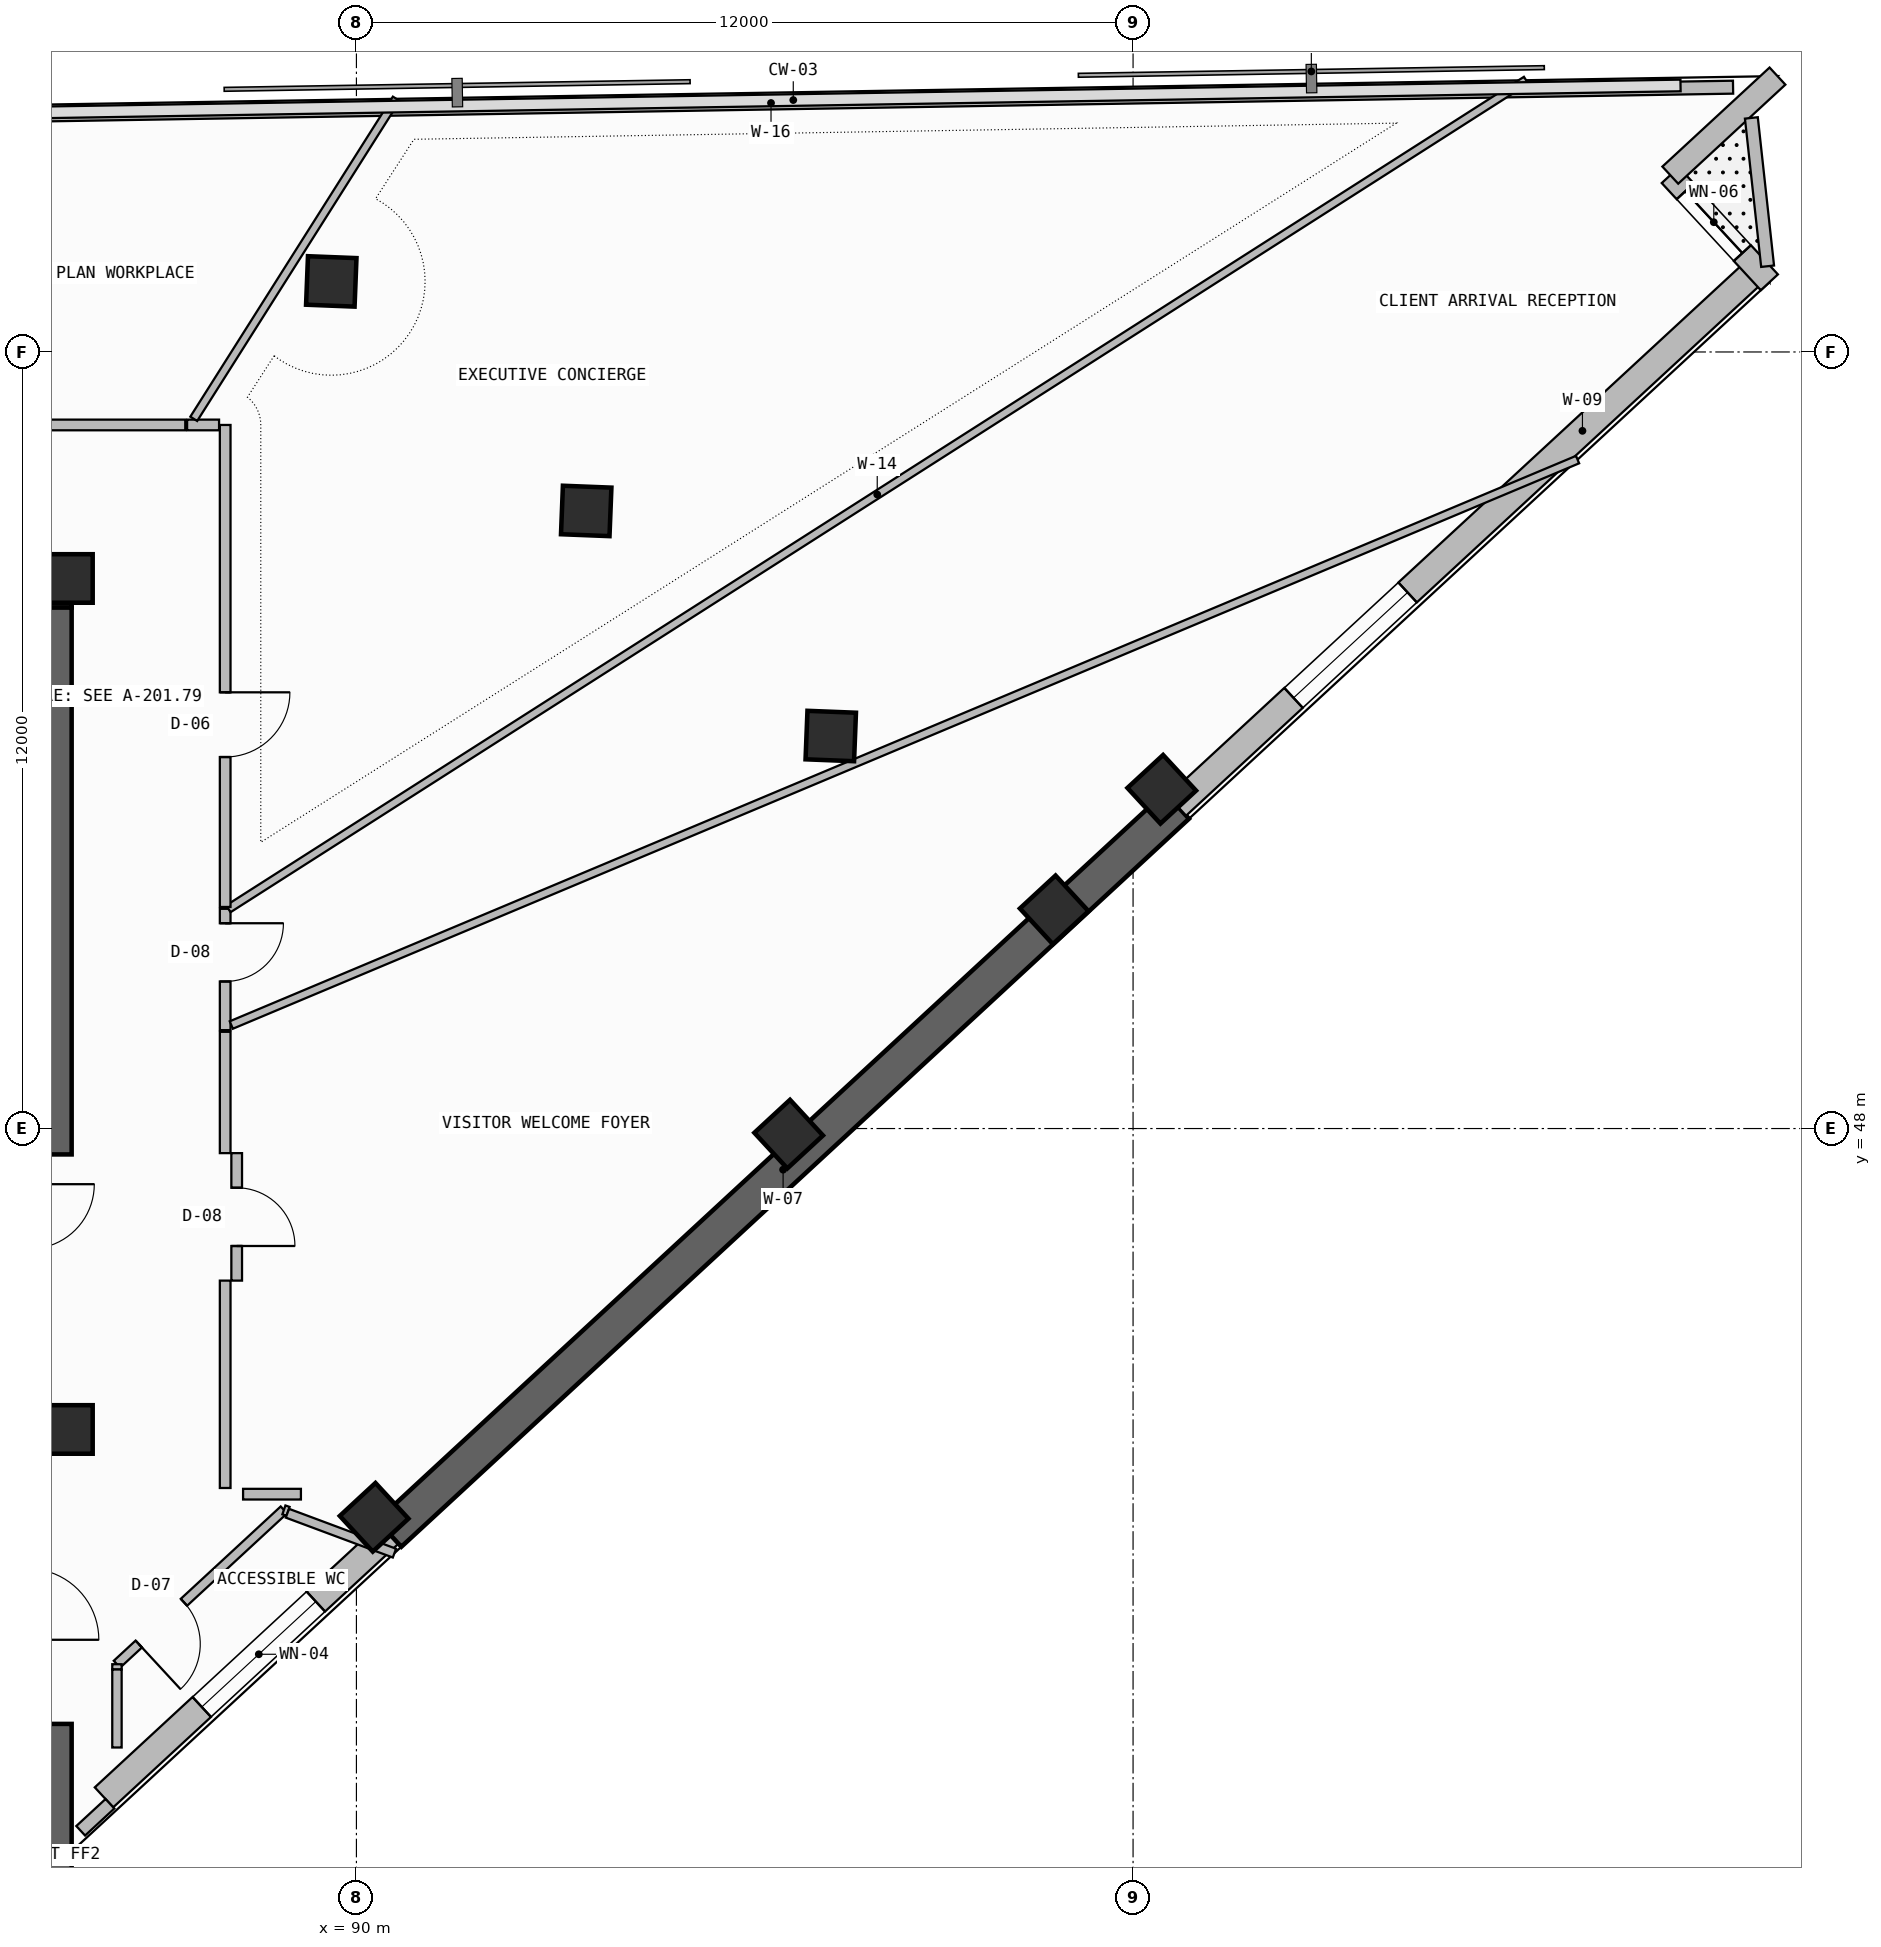
"""IFC4 building model, lengths in metres.
Left out: names, types, materials, properties, quantities, classifications, styles, units other than length and angle.
Written with IfcOpenShell. Run it as: python <this file> out.ifc"""

import sys

from ifc_helpers import new_model, si_unit, direction, frame, frame_2d, origin, origin_2d, place, context, subcontext, project, spatial, rectangle, extrude, element, fill, save


model = new_model("IFC4")
c1 = context("Model", 3, precision=1e-05, world=origin(), true_north=direction((0.0, 1.0)))
c2 = subcontext(c1, "Body", "Model", "MODEL_VIEW")
j1 = project(units=[si_unit("LENGTHUNIT", "METRE"), si_unit("PLANEANGLEUNIT", "RADIAN")], contexts=[c1])
p1 = place(None, origin())
s1 = spatial("IfcSite", under=j1, at=p1, CompositionType="ELEMENT")
p2 = place(p1, origin())
s2 = spatial("IfcBuilding", under=s1, at=p2, CompositionType="ELEMENT")
p3 = place(p2, frame((0.0, 0.0, 281.86)))
s3 = spatial("IfcBuildingStorey", under=s2, at=p3, CompositionType="ELEMENT", Elevation=281.86)
p4 = place(p3, frame((85.3, 35.5, -0.26), z_axis=(0.0, 0.0, 1.0), x_axis=(0.0, 1.0, 0.0)))
e1 = element("IfcWall", 1, at=p4, inside=s3, PredefinedType="SHEAR", context=c2, shape_type="SweptSolid", body=[
    extrude(rectangle(XDim=3.3, YDim=0.6, at=frame_2d((1.65, 0.0))), origin(), (0.0, 0.0, 1.0), 3.52),
])
p5 = place(p3, frame((72.0, 56.35, -0.26), z_axis=(0.0, 0.0, 1.0), x_axis=(1.0, 0.0, 0.0)))
e2 = element("IfcWall", 2, at=p5, inside=s3, PredefinedType="SHEAR", context=c2, shape_type="SweptSolid", body=[
    extrude(rectangle(XDim=13.6, YDim=0.6, at=frame_2d((6.8, 0.0))), origin(), (0.0, 0.0, 1.0), 3.52),
])
p6 = place(p3, frame((85.3, 47.6, -0.26), z_axis=(0.0, 0.0, 1.0), x_axis=(0.0, 1.0, 0.0)))
e3 = element("IfcWall", 3, at=p6, inside=s3, PredefinedType="SHEAR", context=c2, shape_type="SweptSolid", body=[
    extrude(rectangle(XDim=8.45, YDim=0.6, at=frame_2d((4.225, 0.0))), origin(), (0.0, 0.0, 1.0), 3.52),
])
for number, where, z_axis, x_axis in (
    (4, (85.55, 43.35, 0.0), (0.0, 0.0, 1.0), (1.0, 0.0, 0.0)),
    (5, (85.55, 56.5, 0.0), (0.0, 0.0, 1.0), (1.0, 0.0, 0.0)),
    (6, (90.273, 41.993, 0.0), (0.0, 0.0, 1.0), (0.734, 0.679, 0.0)),
    (7, (96.679, 47.914, 0.0), (0.0, 0.0, 1.0), (0.734, 0.679, 0.0)),
    (8, (102.443, 53.242, 0.0), (0.0, 0.0, 1.0), (0.734, 0.679, 0.0)),
    (9, (100.782, 51.38, 0.0), (0.0, 0.0, 1.0), (0.734, 0.679, 0.0)),
    (10, (97.329, 54.065, 0.0), (0.0, 0.0, 1.0), (0.039, 0.999, 0.0)),
    (11, (93.55, 57.544, 0.0), (0.0, 0.0, 1.0), (0.039, 0.999, 0.0)),
    (12, (89.611, 61.09, 0.0), (0.0, 0.0, 1.0), (0.039, 0.999, 0.0)),
):
    element("IfcColumn", number, at=place(p3, frame(where, z_axis=z_axis, x_axis=x_axis)), inside=s3, PredefinedType="COLUMN", context=c2, shape_type="SweptSolid", body=[
        extrude(rectangle(XDim=0.75, YDim=0.75, at=origin_2d()), origin(), (0.0, 0.0, 1.0), 3.52),
    ])
p7 = place(p3, frame((86.1, 37.665, 0.0), z_axis=(0.0, 0.0, 1.0), x_axis=(0.734321413343, 0.678801931277, 0.0)))
e13 = element("IfcWall", 13, at=p7, inside=s3, PredefinedType="SOLIDWALL", context=c2, shape_type="SweptSolid", body=[
    extrude(rectangle(XDim=6.002, YDim=0.42, at=frame_2d((3.001, 0.0))), origin(), (0.0, 0.0, 1.0), 2.245),
])
p8 = place(p7, frame((2.057, 0.0, 0.965)))
e14 = element("IfcOpeningElement", 14, at=p8, cuts=e13, PredefinedType="OPENING", context=c2, shape_type="SweptSolid", body=[
    extrude(rectangle(XDim=2.4, YDim=1.2, at=frame_2d((1.2, 0.6))), frame((0.0, 0.22, 0.0), z_axis=(0.0, -1.0, 0.0), x_axis=(1.0, 0.0, 0.0)), (0.0, 0.0, 1.0), 0.44),
])
p9 = place(p3, frame((90.508, 41.74, -0.26), z_axis=(0.0, 0.0, 1.0), x_axis=(0.734315848115, 0.678807951638, 0.0)))
e15 = element("IfcWall", 15, at=p9, inside=s3, PredefinedType="SHEAR", context=c2, shape_type="SweptSolid", body=[
    extrude(rectangle(XDim=16.573, YDim=0.55, at=frame_2d((8.286, 0.0))), origin(), (0.0, 0.0, 1.0), 3.52),
])
p10 = place(p3, frame((102.677, 52.989, 0.0), z_axis=(0.0, 0.0, 1.0), x_axis=(0.734331107219, 0.678791444386, 0.0)))
e16 = element("IfcWall", 16, at=p10, inside=s3, PredefinedType="SOLIDWALL", context=c2, shape_type="SweptSolid", body=[
    extrude(rectangle(XDim=12.211, YDim=0.42, at=frame_2d((6.106, 0.0))), origin(), (0.0, 0.0, 1.0), 2.245),
])
p11 = place(p10, frame((2.454, 0.0, 0.965)))
e17 = element("IfcOpeningElement", 17, at=p11, cuts=e16, PredefinedType="OPENING", context=c2, shape_type="SweptSolid", body=[
    extrude(rectangle(XDim=2.4, YDim=1.2, at=frame_2d((1.2, 0.6))), frame((0.0, 0.22, 0.0), z_axis=(0.0, -1.0, 0.0), x_axis=(1.0, 0.0, 0.0)), (0.0, 0.0, 1.0), 0.44),
])
p12 = place(p3, frame((111.832, 61.076, 0.0), z_axis=(0.0, 0.0, 1.0), x_axis=(-0.678792531533, 0.734330102294, 0.0)))
e18 = element("IfcWall", 18, at=p12, inside=s3, PredefinedType="SOLIDWALL", context=c2, shape_type="SweptSolid", body=[
    extrude(rectangle(XDim=2.255, YDim=0.36, at=frame_2d((1.127, 0.0))), origin(), (0.0, 0.0, 1.0), 3.26),
])
p13 = place(p12, frame((0.615, 0.0, 0.45)))
e19 = element("IfcOpeningElement", 19, at=p13, cuts=e18, PredefinedType="OPENING", context=c2, shape_type="SweptSolid", body=[
    extrude(rectangle(XDim=1.3, YDim=2.4, at=frame_2d((0.65, 1.2))), frame((0.0, 0.19, 0.0), z_axis=(0.0, -1.0, 0.0), x_axis=(1.0, 0.0, 0.0)), (0.0, 0.0, 1.0), 0.38),
])
p14 = place(p3, frame((110.301, 62.732, 0.0), z_axis=(0.0, 0.0, 1.0), x_axis=(0.734330102294, 0.678792531533, 0.0)))
e20 = element("IfcWall", 20, at=p14, inside=s3, PredefinedType="SOLIDWALL", context=c2, shape_type="SweptSolid", body=[
    extrude(rectangle(XDim=2.255, YDim=0.36, at=frame_2d((1.127, 0.0))), origin(), (0.0, 0.0, 1.0), 3.26),
])
p15 = place(p3, frame((111.804, 61.325, 0.0), z_axis=(0.0, 0.0, 1.0), x_axis=(-0.10875765817, 0.994068293323, 0.0)))
e21 = element("IfcWall", 21, at=p15, inside=s3, PredefinedType="PARAPET", context=c2, shape_type="SweptSolid", body=[
    extrude(rectangle(XDim=2.305, YDim=0.2, at=frame_2d((1.153, 0.0))), origin(), (0.0, 0.0, 1.0), 1.15),
])
p16 = place(p3, frame((111.271, 64.092, 0.0), z_axis=(0.0, 0.0, 1.0), x_axis=(-0.999864741935, -0.016446818413, 0.0)))
e22 = element("IfcWall", 22, at=p16, inside=s3, PredefinedType="PARAPET", context=c2, shape_type="SweptSolid", body=[
    extrude(rectangle(XDim=29.733, YDim=0.2, at=frame_2d((14.866, 0.0))), origin(), (0.0, 0.0, 1.0), 1.15),
])
p17 = place(p3, frame((86.192, 37.566, 0.0), z_axis=(0.0, 0.0, 1.0), x_axis=(-0.734346728958, -0.678774544064, 0.0)))
e23 = element("IfcWall", 23, at=p17, inside=s3, PredefinedType="PARAPET", context=c2, shape_type="SweptSolid", body=[
    extrude(rectangle(XDim=0.615, YDim=0.2, at=frame_2d((0.308, 0.0))), origin(), (0.0, 0.0, 1.0), 1.15),
])
p18 = place(p3, frame((86.3, 39.722, 0.0), z_axis=(0.0, 0.0, 1.0), x_axis=(0.734328937731, 0.678793791376, 0.0)))
e24 = element("IfcWall", 24, at=p18, inside=s3, PredefinedType="PARTITIONING", context=c2, shape_type="SweptSolid", body=[
    extrude(rectangle(XDim=3.512, YDim=0.145, at=frame_2d((1.756, 0.0))), origin(), (0.0, 0.0, 1.0), 3.26),
])
p19 = place(p18, frame((0.459, 0.0, 0.0)))
e25 = element("IfcOpeningElement", 25, at=p19, cuts=e24, PredefinedType="OPENING", context=c2, shape_type="SweptSolid", body=[
    extrude(rectangle(XDim=0.95, YDim=2.15, at=frame_2d((0.475, 1.075))), frame((0.0, 0.083, 0.0), z_axis=(0.0, -1.0, 0.0), x_axis=(1.0, 0.0, 0.0)), (0.0, 0.0, 1.0), 0.165),
])
p20 = place(p3, frame((86.3, 39.641, 0.0), z_axis=(0.0, 0.0, 1.0), x_axis=(0.0, 1.0, 0.0)))
e26 = element("IfcWall", 26, at=p20, inside=s3, PredefinedType="PARTITIONING", context=c2, shape_type="SweptSolid", body=[
    extrude(rectangle(XDim=0.082, YDim=0.145, at=frame_2d((0.041, 0.0))), origin(), (0.0, 0.0, 1.0), 3.26),
])
p21 = place(p3, frame((88.879, 42.107, 0.0), z_axis=(0.0, 0.0, 1.0), x_axis=(0.946510188179, -0.322673927788, 0.0)))
e27 = element("IfcWall", 27, at=p21, inside=s3, PredefinedType="PARTITIONING", context=c2, shape_type="SweptSolid", body=[
    extrude(rectangle(XDim=0.068, YDim=0.145, at=frame_2d((0.034, 0.0))), origin(), (0.0, 0.0, 1.0), 3.26),
])
p22 = place(p3, frame((88.934, 42.055, 0.0), z_axis=(0.0, 0.0, 1.0), x_axis=(0.937037747799, -0.349228090508, 0.0)))
e28 = element("IfcWall", 28, at=p22, inside=s3, PredefinedType="PARTITIONING", context=c2, shape_type="SweptSolid", body=[
    extrude(rectangle(XDim=1.765, YDim=0.145, at=frame_2d((0.883, 0.0))), origin(), (0.0, 0.0, 1.0), 2.245),
])
p23 = place(p3, frame((87.972, 49.521, 0.0), z_axis=(0.0, 0.0, 1.0), x_axis=(0.0, 1.0, 0.0)))
e29 = element("IfcWall", 29, at=p23, inside=s3, PredefinedType="PARTITIONING", context=c2, shape_type="SweptSolid", body=[
    extrude(rectangle(XDim=1.875, YDim=0.165, at=frame_2d((0.938, 0.0))), origin(), (0.0, 0.0, 1.0), 3.26),
])
p24 = place(p23, frame((0.752, 0.0, 0.0)))
e30 = element("IfcOpeningElement", 30, at=p24, cuts=e29, PredefinedType="OPENING", context=c2, shape_type="SweptSolid", body=[
    extrude(rectangle(XDim=0.9, YDim=2.1, at=frame_2d((0.45, 1.05))), frame((0.0, 0.093, 0.0), z_axis=(0.0, -1.0, 0.0), x_axis=(1.0, 0.0, 0.0)), (0.0, 0.0, 1.0), 0.185),
])
p25 = place(p3, frame((108.868, 58.337, 0.0), z_axis=(0.0, 0.0, 1.0), x_axis=(-0.921966033449, -0.387270749174, 0.0)))
e31 = element("IfcWall", 31, at=p25, inside=s3, PredefinedType="PARTITIONING", context=c2, shape_type="SweptSolid", body=[
    extrude(rectangle(XDim=22.562, YDim=0.125, at=frame_2d((11.281, 0.0))), origin(), (0.0, 0.0, 1.0), 2.645),
])
p26 = place(p3, frame((88.021, 51.396, 0.0), z_axis=(0.0, 0.0, 1.0), x_axis=(0.842826341775, 0.538185616316, 0.0)))
e32 = element("IfcWall", 32, at=p26, inside=s3, PredefinedType="PARTITIONING", context=c2, shape_type="SweptSolid", body=[
    extrude(rectangle(XDim=23.791, YDim=0.125, at=frame_2d((11.895, 0.0))), origin(), (0.0, 0.0, 1.0), 2.645),
])
p27 = place(p3, frame((87.972, 42.446, 0.0), z_axis=(0.0, 0.0, 1.0), x_axis=(0.0, 1.0, 0.0)))
e33 = element("IfcWall", 33, at=p27, inside=s3, PredefinedType="PARTITIONING", context=c2, shape_type="SweptSolid", body=[
    extrude(rectangle(XDim=3.204, YDim=0.165, at=frame_2d((1.602, 0.0))), origin(), (0.0, 0.0, 1.0), 2.745),
])
p28 = place(p3, frame((88.15, 45.65, 0.0), z_axis=(0.0, 0.0, 1.0), x_axis=(0.0, 1.0, 0.0)))
e34 = element("IfcWall", 34, at=p28, inside=s3, PredefinedType="PARTITIONING", context=c2, shape_type="SweptSolid", body=[
    extrude(rectangle(XDim=1.97, YDim=0.165, at=frame_2d((0.985, 0.0))), origin(), (0.0, 0.0, 1.0), 3.26),
])
p29 = place(p28, frame((0.535, 0.0, 0.0)))
e35 = element("IfcOpeningElement", 35, at=p29, cuts=e34, PredefinedType="OPENING", context=c2, shape_type="SweptSolid", body=[
    extrude(rectangle(XDim=0.9, YDim=2.1, at=frame_2d((0.45, 1.05))), frame((0.0, 0.093, 0.0), z_axis=(0.0, -1.0, 0.0), x_axis=(1.0, 0.0, 0.0)), (0.0, 0.0, 1.0), 0.185),
])
p30 = place(p3, frame((87.972, 47.62, 0.0), z_axis=(0.0, 0.0, 1.0), x_axis=(0.0, 1.0, 0.0)))
e36 = element("IfcWall", 36, at=p30, inside=s3, PredefinedType="PARTITIONING", context=c2, shape_type="SweptSolid", body=[
    extrude(rectangle(XDim=1.875, YDim=0.165, at=frame_2d((0.937, 0.0))), origin(), (0.0, 0.0, 1.0), 3.26),
])
p31 = place(p3, frame((89.143, 42.35, 0.0), z_axis=(0.0, 0.0, 1.0), x_axis=(-1.0, 0.0, 0.0)))
e37 = element("IfcWall", 37, at=p31, inside=s3, PredefinedType="PARTITIONING", context=c2, shape_type="SweptSolid", body=[
    extrude(rectangle(XDim=0.894, YDim=0.165, at=frame_2d((0.447, 0.0))), origin(), (0.0, 0.0, 1.0), 2.745),
])
p32 = place(p3, frame((87.972, 51.424, 0.0), z_axis=(0.0, 0.0, 1.0), x_axis=(0.0, 1.0, 0.0)))
e38 = element("IfcWall", 38, at=p32, inside=s3, PredefinedType="PARTITIONING", context=c2, shape_type="SweptSolid", body=[
    extrude(rectangle(XDim=7.448, YDim=0.165, at=frame_2d((3.724, 0.0))), origin(), (0.0, 0.0, 1.0), 2.745),
])
p33 = place(p32, frame((2.317, 0.0, 0.0)))
e39 = element("IfcOpeningElement", 39, at=p33, cuts=e38, PredefinedType="OPENING", context=c2, shape_type="SweptSolid", body=[
    extrude(rectangle(XDim=1.0, YDim=2.2, at=frame_2d((0.5, 1.1))), frame((0.0, 0.093, 0.0), z_axis=(0.0, -1.0, 0.0), x_axis=(1.0, 0.0, 0.0)), (0.0, 0.0, 1.0), 0.185),
])
p34 = place(p3, frame((87.878, 58.872, 0.0), z_axis=(0.0, 0.0, 1.0), x_axis=(-1.0, 0.0, 0.0)))
e40 = element("IfcWall", 40, at=p34, inside=s3, PredefinedType="PARTITIONING", context=c2, shape_type="SweptSolid", body=[
    extrude(rectangle(XDim=0.494, YDim=0.165, at=frame_2d((0.247, 0.0))), origin(), (0.0, 0.0, 1.0), 2.745),
])
p35 = place(p3, frame((87.487, 58.967, 0.0), z_axis=(0.0, 0.0, 1.0), x_axis=(0.534730479589, 0.845022670819, 0.0)))
e41 = element("IfcWall", 41, at=p35, inside=s3, PredefinedType="PARTITIONING", context=c2, shape_type="SweptSolid", body=[
    extrude(rectangle(XDim=5.852, YDim=0.125, at=frame_2d((2.926, 0.0))), origin(), (0.0, 0.0, 1.0), 2.745),
])
p36 = place(p3, frame((87.355, 58.872, 0.0), z_axis=(0.0, 0.0, 1.0), x_axis=(-1.0, 0.0, 0.0)))
e42 = element("IfcWall", 42, at=p36, inside=s3, PredefinedType="PARTITIONING", context=c2, shape_type="SweptSolid", body=[
    extrude(rectangle(XDim=7.706, YDim=0.165, at=frame_2d((3.853, 0.0))), origin(), (0.0, 0.0, 1.0), 2.745),
])
p37 = place(p36, frame((3.909, 0.0, 0.0)))
e43 = element("IfcOpeningElement", 43, at=p37, cuts=e42, PredefinedType="OPENING", context=c2, shape_type="SweptSolid", body=[
    extrude(rectangle(XDim=1.6, YDim=2.3, at=frame_2d((0.8, 1.15))), frame((0.0, 0.093, 0.0), z_axis=(0.0, -1.0, 0.0), x_axis=(1.0, 0.0, 0.0)), (0.0, 0.0, 1.0), 0.185),
])
p38 = place(p3, frame((86.3, 38.436, 0.0), z_axis=(0.0, 0.0, 1.0), x_axis=(0.0, 1.0, 0.0)))
e44 = element("IfcWall", 44, at=p38, inside=s3, PredefinedType="PARTITIONING", context=c2, shape_type="SweptSolid", body=[
    extrude(rectangle(XDim=1.205, YDim=0.145, at=frame_2d((0.603, 0.0))), origin(), (0.0, 0.0, 1.0), 3.26),
])
p39 = place(p8, origin())
e45 = element("IfcWindow", 45, at=p39, inside=s3, PartitioningType="SINGLE_PANEL", PredefinedType="WINDOW", context=c2, shape_type="SweptSolid", body=[
    extrude(rectangle(XDim=2.4, YDim=1.2, at=frame_2d((1.2, 0.6))), frame((0.0, 0.03, 0.0), z_axis=(0.0, -1.0, 0.0), x_axis=(1.0, 0.0, 0.0)), (0.0, 0.0, 1.0), 0.06),
])
fill(e14, e45)
p40 = place(p11, origin())
e46 = element("IfcWindow", 46, at=p40, inside=s3, PartitioningType="SINGLE_PANEL", PredefinedType="WINDOW", context=c2, shape_type="SweptSolid", body=[
    extrude(rectangle(XDim=2.4, YDim=1.2, at=frame_2d((1.2, 0.6))), frame((0.0, 0.03, 0.0), z_axis=(0.0, -1.0, 0.0), x_axis=(1.0, 0.0, 0.0)), (0.0, 0.0, 1.0), 0.06),
])
fill(e17, e46)
p41 = place(p13, origin())
e47 = element("IfcWindow", 47, at=p41, inside=s3, PartitioningType="SINGLE_PANEL", PredefinedType="WINDOW", context=c2, shape_type="SweptSolid", body=[
    extrude(rectangle(XDim=1.3, YDim=2.4, at=frame_2d((0.65, 1.2))), frame((0.0, 0.03, 0.0), z_axis=(0.0, -1.0, 0.0), x_axis=(1.0, 0.0, 0.0)), (0.0, 0.0, 1.0), 0.06),
])
fill(e19, e47)
p42 = place(p19, frame((0.95, 0.0, 0.0), z_axis=(0.0, 0.0, 1.0), x_axis=(-1.0, 0.0, 0.0)))
e48 = element("IfcDoor", 48, at=p42, inside=s3, OperationType="SINGLE_SWING_RIGHT", PredefinedType="DOOR", context=c2, shape_type="SweptSolid", body=[
    extrude(rectangle(XDim=0.95, YDim=2.15, at=frame_2d((0.475, 1.075))), frame((0.0, 0.025, 0.0), z_axis=(0.0, -1.0, 0.0), x_axis=(1.0, 0.0, 0.0)), (0.0, 0.0, 1.0), 0.05),
])
fill(e25, e48)
p43 = place(p24, frame((0.9, 0.0, 0.0), z_axis=(0.0, 0.0, 1.0), x_axis=(-1.0, 0.0, 0.0)))
e49 = element("IfcDoor", 49, at=p43, inside=s3, OperationType="SINGLE_SWING_LEFT", PredefinedType="DOOR", context=c2, shape_type="SweptSolid", body=[
    extrude(rectangle(XDim=0.9, YDim=2.1, at=frame_2d((0.45, 1.05))), frame((0.0, 0.025, 0.0), z_axis=(0.0, -1.0, 0.0), x_axis=(1.0, 0.0, 0.0)), (0.0, 0.0, 1.0), 0.05),
])
fill(e30, e49)
p44 = place(p29, frame((0.9, 0.0, 0.0), z_axis=(0.0, 0.0, 1.0), x_axis=(-1.0, 0.0, 0.0)))
e50 = element("IfcDoor", 50, at=p44, inside=s3, OperationType="SINGLE_SWING_RIGHT", PredefinedType="DOOR", context=c2, shape_type="SweptSolid", body=[
    extrude(rectangle(XDim=0.9, YDim=2.1, at=frame_2d((0.45, 1.05))), frame((0.0, 0.025, 0.0), z_axis=(0.0, -1.0, 0.0), x_axis=(1.0, 0.0, 0.0)), (0.0, 0.0, 1.0), 0.05),
])
fill(e35, e50)
p45 = place(p33, frame((1.0, 0.0, 0.0), z_axis=(0.0, 0.0, 1.0), x_axis=(-1.0, 0.0, 0.0)))
e51 = element("IfcDoor", 51, at=p45, inside=s3, OperationType="SINGLE_SWING_LEFT", PredefinedType="DOOR", context=c2, shape_type="SweptSolid", body=[
    extrude(rectangle(XDim=1.0, YDim=2.2, at=frame_2d((0.5, 1.1))), frame((0.0, 0.025, 0.0), z_axis=(0.0, -1.0, 0.0), x_axis=(1.0, 0.0, 0.0)), (0.0, 0.0, 1.0), 0.05),
])
fill(e39, e51)
save(model, sys.argv[1])
